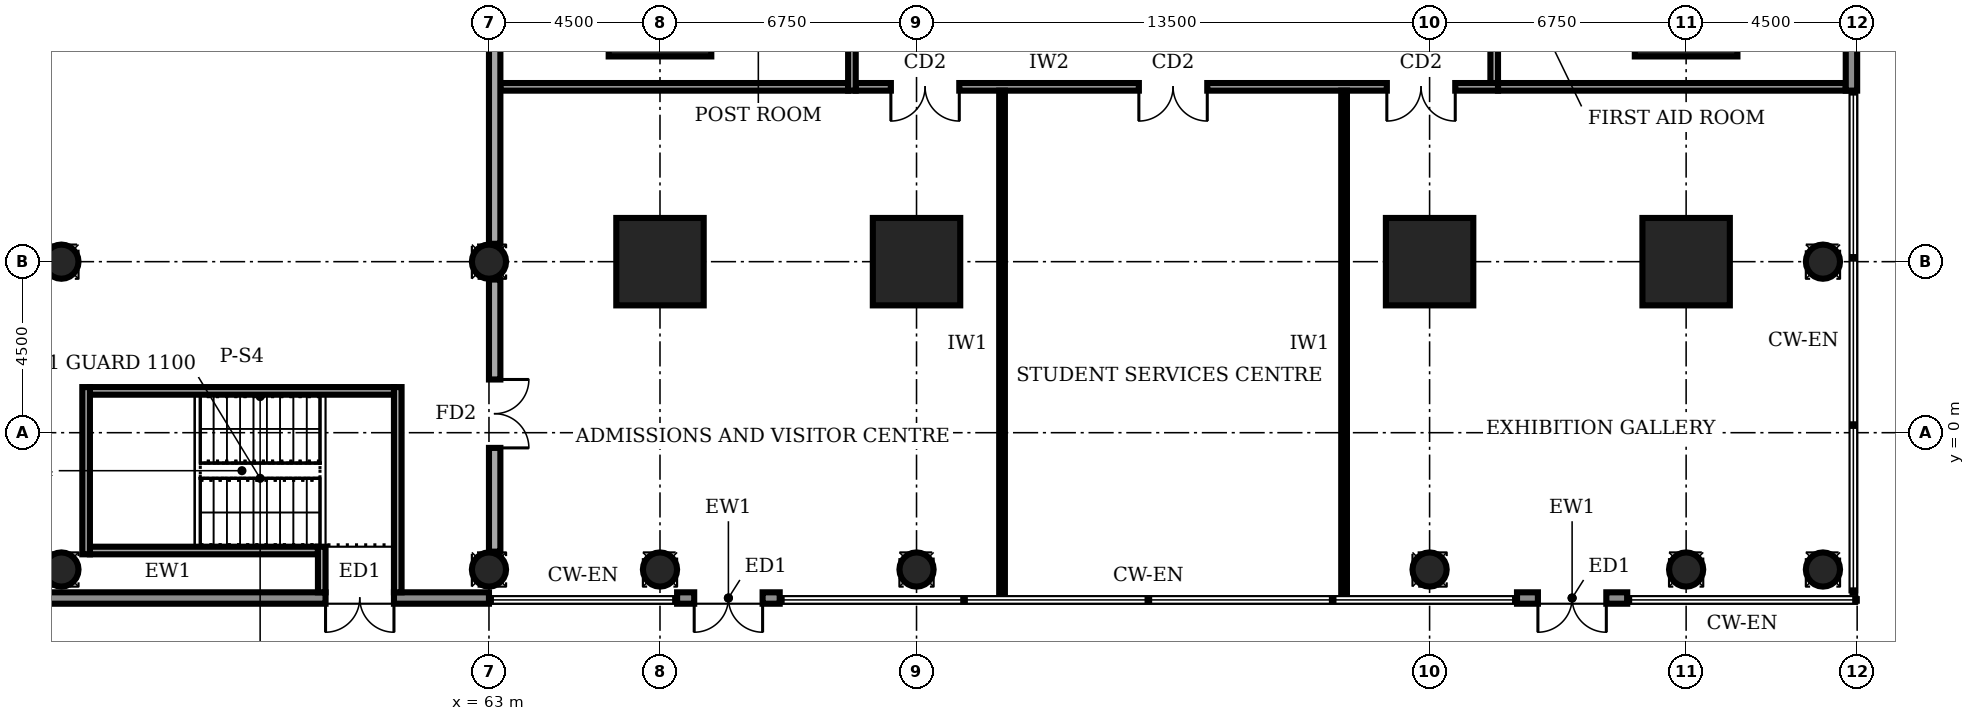
"""IFC4 building model, lengths in metres.
Left out: names, types, materials, properties, quantities, classifications, styles, units other than length and angle.
Written with IfcOpenShell. Run it as: python <this file> out.ifc"""

import sys

from ifc_helpers import new_model, si_unit, direction, frame, frame_2d, origin, origin_2d, place, context, subcontext, project, spatial, rectangle, circle, extrude, element, fill, save


model = new_model("IFC4")
c1 = context("Model", 3, precision=1e-05, world=origin(), true_north=direction((0.0, 1.0)))
c2 = subcontext(c1, "Body", "Model", "MODEL_VIEW")
j1 = project(units=[si_unit("LENGTHUNIT", "METRE"), si_unit("PLANEANGLEUNIT", "RADIAN")], contexts=[c1])
p1 = place(None, origin())
s1 = spatial("IfcSite", under=j1, at=p1, CompositionType="ELEMENT")
p2 = place(p1, origin())
s2 = spatial("IfcBuilding", under=s1, at=p2, CompositionType="ELEMENT")
p3 = place(p2, origin())
s3 = spatial("IfcBuildingStorey", under=s2, at=p3, CompositionType="ELEMENT", Elevation=0.0)
for number, where, z_axis, x_axis in (
    (1, (67.5, 4.5, -0.4), (0.0, 0.0, 1.0), (1.0, 0.0, 0.0)),
    (2, (74.25, 4.5, -0.4), (0.0, 0.0, 1.0), (1.0, 0.0, 0.0)),
    (3, (87.75, 4.5, -0.4), (0.0, 0.0, 1.0), (1.0, 0.0, 0.0)),
    (4, (94.5, 4.5, -0.4), (0.0, 0.0, 1.0), (1.0, 0.0, 0.0)),
):
    element("IfcColumn", number, at=place(p3, frame(where, z_axis=z_axis, x_axis=x_axis)), inside=s3, PredefinedType="COLUMN", context=c2, shape_type="SweptSolid", body=[
        extrude(rectangle(XDim=2.3, YDim=2.3, at=origin_2d()), origin(), (0.0, 0.0, 1.0), 6.4),
    ])
for number, where, z_axis, x_axis in (
    (5, (67.5, 11.25, -0.4), (0.0, 0.0, 1.0), (1.0, 0.0, 0.0)),
    (6, (94.5, 11.25, -0.4), (0.0, 0.0, 1.0), (1.0, 0.0, 0.0)),
):
    element("IfcColumn", number, at=place(p3, frame(where, z_axis=z_axis, x_axis=x_axis)), inside=s3, PredefinedType="COLUMN", context=c2, shape_type="SweptSolid", body=[
        extrude(rectangle(XDim=2.7, YDim=2.7, at=origin_2d()), origin(), (0.0, 0.0, 1.0), 6.4),
    ])
for number, where, z_axis, x_axis in (
    (7, (51.75, -3.6, -0.4), (0.0, 0.0, 1.0), (1.0, 0.0, 0.0)),
    (8, (63.0, -3.6, -0.4), (0.0, 0.0, 1.0), (1.0, 0.0, 0.0)),
    (9, (67.5, -3.6, -0.4), (0.0, 0.0, 1.0), (1.0, 0.0, 0.0)),
    (10, (74.25, -3.6, -0.4), (0.0, 0.0, 1.0), (1.0, 0.0, 0.0)),
    (11, (87.75, -3.6, -0.4), (0.0, 0.0, 1.0), (1.0, 0.0, 0.0)),
    (12, (94.5, -3.6, -0.4), (0.0, 0.0, 1.0), (1.0, 0.0, 0.0)),
    (13, (98.1, -3.6, -0.4), (0.0, 0.0, 1.0), (1.0, 0.0, 0.0)),
    (14, (51.75, 4.5, -0.4), (0.0, 0.0, 1.0), (1.0, 0.0, 0.0)),
    (15, (63.0, 4.5, -0.4), (0.0, 0.0, 1.0), (1.0, 0.0, 0.0)),
    (16, (98.1, 4.5, -0.4), (0.0, 0.0, 1.0), (1.0, 0.0, 0.0)),
):
    element("IfcColumn", number, at=place(p3, frame(where, z_axis=z_axis, x_axis=x_axis)), inside=s3, PredefinedType="COLUMN", context=c2, shape_type="SweptSolid", body=[
        extrude(circle(Radius=0.45, at=origin_2d()), origin(), (0.0, 0.0, 1.0), 6.4),
    ])
p4 = place(p3, frame((40.5, -4.35, 0.0), z_axis=(0.0, 0.0, 1.0), x_axis=(1.0, 0.0, 0.0)))
e17 = element("IfcWall", 17, at=p4, inside=s3, PredefinedType="STANDARD", context=c2, shape_type="SweptSolid", body=[
    extrude(rectangle(XDim=22.5, YDim=0.3, at=frame_2d((11.25, 0.0))), origin(), (0.0, 0.0, 1.0), 5.7),
])
p5 = place(p4, frame((3.6, 0.0, 0.0)))
e18 = element("IfcOpeningElement", 18, at=p5, cuts=e17, PredefinedType="OPENING", context=c2, shape_type="SweptSolid", body=[
    extrude(rectangle(XDim=1.8, YDim=2.4, at=frame_2d((0.9, 1.2))), frame((0.0, 0.16, 0.0), z_axis=(0.0, -1.0, 0.0), x_axis=(1.0, 0.0, 0.0)), (0.0, 0.0, 1.0), 0.32),
])
p6 = place(p4, frame((8.1, 0.0, 0.0)))
e19 = element("IfcOpeningElement", 19, at=p6, cuts=e17, PredefinedType="OPENING", context=c2, shape_type="SweptSolid", body=[
    extrude(rectangle(XDim=1.8, YDim=2.4, at=frame_2d((0.9, 1.2))), frame((0.0, 0.16, 0.0), z_axis=(0.0, -1.0, 0.0), x_axis=(1.0, 0.0, 0.0)), (0.0, 0.0, 1.0), 0.32),
])
p7 = place(p4, frame((18.2, 0.0, 0.0)))
e20 = element("IfcOpeningElement", 20, at=p7, cuts=e17, PredefinedType="OPENING", context=c2, shape_type="SweptSolid", body=[
    extrude(rectangle(XDim=1.8, YDim=2.4, at=frame_2d((0.9, 1.2))), frame((0.0, 0.16, 0.0), z_axis=(0.0, -1.0, 0.0), x_axis=(1.0, 0.0, 0.0)), (0.0, 0.0, 1.0), 0.32),
])
p8 = place(p3, frame((67.95, -4.35, 0.0), z_axis=(0.0, 0.0, 1.0), x_axis=(1.0, 0.0, 0.0)))
e21 = element("IfcWall", 21, at=p8, inside=s3, PredefinedType="STANDARD", context=c2, shape_type="SweptSolid", body=[
    extrude(rectangle(XDim=2.7, YDim=0.3, at=frame_2d((1.35, 0.0))), origin(), (0.0, 0.0, 1.0), 5.7),
])
p9 = place(p8, frame((0.45, 0.0, 0.0)))
e22 = element("IfcOpeningElement", 22, at=p9, cuts=e21, PredefinedType="OPENING", context=c2, shape_type="SweptSolid", body=[
    extrude(rectangle(XDim=1.8, YDim=2.4, at=frame_2d((0.9, 1.2))), frame((0.0, 0.16, 0.0), z_axis=(0.0, -1.0, 0.0), x_axis=(1.0, 0.0, 0.0)), (0.0, 0.0, 1.0), 0.32),
])
p10 = place(p3, frame((90.05, -4.35, 0.0), z_axis=(0.0, 0.0, 1.0), x_axis=(1.0, 0.0, 0.0)))
e23 = element("IfcWall", 23, at=p10, inside=s3, PredefinedType="STANDARD", context=c2, shape_type="SweptSolid", body=[
    extrude(rectangle(XDim=2.9, YDim=0.3, at=frame_2d((1.45, 0.0))), origin(), (0.0, 0.0, 1.0), 5.7),
])
p11 = place(p10, frame((0.55, 0.0, 0.0)))
e24 = element("IfcOpeningElement", 24, at=p11, cuts=e23, PredefinedType="OPENING", context=c2, shape_type="SweptSolid", body=[
    extrude(rectangle(XDim=1.8, YDim=2.4, at=frame_2d((0.9, 1.2))), frame((0.0, 0.16, 0.0), z_axis=(0.0, -1.0, 0.0), x_axis=(1.0, 0.0, 0.0)), (0.0, 0.0, 1.0), 0.32),
])
p12 = place(p3, frame((98.85, 9.0, 0.0), z_axis=(0.0, 0.0, 1.0), x_axis=(0.0, 1.0, 0.0)))
e25 = element("IfcWall", 25, at=p12, inside=s3, PredefinedType="STANDARD", context=c2, shape_type="SweptSolid", body=[
    extrude(rectangle(XDim=4.5, YDim=0.3, at=frame_2d((2.25, 0.0))), origin(), (0.0, 0.0, 1.0), 5.7),
])
p13 = place(p12, frame((2.8, 0.0, 0.0)))
e26 = element("IfcOpeningElement", 26, at=p13, cuts=e25, PredefinedType="OPENING", context=c2, shape_type="SweptSolid", body=[
    extrude(rectangle(XDim=1.6, YDim=2.4, at=frame_2d((0.8, 1.2))), frame((0.0, 0.16, 0.0), z_axis=(0.0, -1.0, 0.0), x_axis=(1.0, 0.0, 0.0)), (0.0, 0.0, 1.0), 0.32),
])
p14 = place(p3, frame((72.65, 9.1, 0.0), z_axis=(0.0, 0.0, 1.0), x_axis=(1.0, 0.0, 0.0)))
e27 = element("IfcWall", 27, at=p14, inside=s3, PredefinedType="SOLIDWALL", context=c2, shape_type="SweptSolid", body=[
    extrude(rectangle(XDim=16.9, YDim=0.2, at=frame_2d((8.45, 0.0))), origin(), (0.0, 0.0, 1.0), 5.7),
])
p15 = place(p14, frame((0.925, 0.0, 0.0)))
e28 = element("IfcOpeningElement", 28, at=p15, cuts=e27, PredefinedType="OPENING", context=c2, shape_type="SweptSolid", body=[
    extrude(rectangle(XDim=1.8, YDim=2.1, at=frame_2d((0.9, 1.05))), frame((0.0, 0.11, 0.0), z_axis=(0.0, -1.0, 0.0), x_axis=(1.0, 0.0, 0.0)), (0.0, 0.0, 1.0), 0.22),
])
p16 = place(p14, frame((7.45, 0.0, 0.0)))
e29 = element("IfcOpeningElement", 29, at=p16, cuts=e27, PredefinedType="OPENING", context=c2, shape_type="SweptSolid", body=[
    extrude(rectangle(XDim=1.8, YDim=2.1, at=frame_2d((0.9, 1.05))), frame((0.0, 0.11, 0.0), z_axis=(0.0, -1.0, 0.0), x_axis=(1.0, 0.0, 0.0)), (0.0, 0.0, 1.0), 0.22),
])
p17 = place(p14, frame((13.975, 0.0, 0.0)))
e30 = element("IfcOpeningElement", 30, at=p17, cuts=e27, PredefinedType="OPENING", context=c2, shape_type="SweptSolid", body=[
    extrude(rectangle(XDim=1.8, YDim=2.1, at=frame_2d((0.9, 1.05))), frame((0.0, 0.11, 0.0), z_axis=(0.0, -1.0, 0.0), x_axis=(1.0, 0.0, 0.0)), (0.0, 0.0, 1.0), 0.22),
])
p18 = place(p3, frame((89.45, 9.2, 0.0), z_axis=(0.0, 0.0, 1.0), x_axis=(0.0, 1.0, 0.0)))
e31 = element("IfcWall", 31, at=p18, inside=s3, PredefinedType="SOLIDWALL", context=c2, shape_type="SweptSolid", body=[
    extrude(rectangle(XDim=22.3, YDim=0.2, at=frame_2d((11.15, 0.0))), origin(), (0.0, 0.0, 1.0), 5.7),
])
p19 = place(p18, frame((1.55, 0.0, 0.0)))
e32 = element("IfcOpeningElement", 32, at=p19, cuts=e31, PredefinedType="OPENING", context=c2, shape_type="SweptSolid", body=[
    extrude(rectangle(XDim=1.0, YDim=2.1, at=frame_2d((0.5, 1.05))), frame((0.0, 0.11, 0.0), z_axis=(0.0, -1.0, 0.0), x_axis=(1.0, 0.0, 0.0)), (0.0, 0.0, 1.0), 0.22),
])
p20 = place(p18, frame((5.75, 0.0, 0.0)))
e33 = element("IfcOpeningElement", 33, at=p20, cuts=e31, PredefinedType="OPENING", context=c2, shape_type="SweptSolid", body=[
    extrude(rectangle(XDim=0.9, YDim=2.1, at=frame_2d((0.45, 1.05))), frame((0.0, 0.11, 0.0), z_axis=(0.0, -1.0, 0.0), x_axis=(1.0, 0.0, 0.0)), (0.0, 0.0, 1.0), 0.22),
])
p21 = place(p18, frame((8.75, 0.0, 0.0)))
e34 = element("IfcOpeningElement", 34, at=p21, cuts=e31, PredefinedType="OPENING", context=c2, shape_type="SweptSolid", body=[
    extrude(rectangle(XDim=0.9, YDim=2.1, at=frame_2d((0.45, 1.05))), frame((0.0, 0.11, 0.0), z_axis=(0.0, -1.0, 0.0), x_axis=(1.0, 0.0, 0.0)), (0.0, 0.0, 1.0), 0.22),
])
p22 = place(p18, frame((13.6, 0.0, 0.0)))
e35 = element("IfcOpeningElement", 35, at=p22, cuts=e31, PredefinedType="OPENING", context=c2, shape_type="SweptSolid", body=[
    extrude(rectangle(XDim=0.9, YDim=2.1, at=frame_2d((0.45, 1.05))), frame((0.0, 0.11, 0.0), z_axis=(0.0, -1.0, 0.0), x_axis=(1.0, 0.0, 0.0)), (0.0, 0.0, 1.0), 0.22),
])
p23 = place(p18, frame((16.3, 0.0, 0.0)))
e36 = element("IfcOpeningElement", 36, at=p23, cuts=e31, PredefinedType="OPENING", context=c2, shape_type="SweptSolid", body=[
    extrude(rectangle(XDim=1.0, YDim=2.1, at=frame_2d((0.5, 1.05))), frame((0.0, 0.11, 0.0), z_axis=(0.0, -1.0, 0.0), x_axis=(1.0, 0.0, 0.0)), (0.0, 0.0, 1.0), 0.22),
])
p24 = place(p18, frame((10.8, 0.0, 0.0)))
e37 = element("IfcOpeningElement", 37, at=p24, cuts=e31, PredefinedType="OPENING", context=c2, shape_type="SweptSolid", body=[
    extrude(rectangle(XDim=1.0, YDim=2.1, at=frame_2d((0.5, 1.05))), frame((0.0, 0.11, 0.0), z_axis=(0.0, -1.0, 0.0), x_axis=(1.0, 0.0, 0.0)), (0.0, 0.0, 1.0), 0.22),
])
p25 = place(p18, frame((19.25, 0.0, 0.0)))
e38 = element("IfcOpeningElement", 38, at=p25, cuts=e31, PredefinedType="OPENING", context=c2, shape_type="SweptSolid", body=[
    extrude(rectangle(XDim=1.6, YDim=2.1, at=frame_2d((0.8, 1.05))), frame((0.0, 0.11, 0.0), z_axis=(0.0, -1.0, 0.0), x_axis=(1.0, 0.0, 0.0)), (0.0, 0.0, 1.0), 0.22),
])
p26 = place(p3, frame((72.55, 31.3, 0.0), z_axis=(0.0, 0.0, 1.0), x_axis=(0.0, -1.0, 0.0)))
e39 = element("IfcWall", 39, at=p26, inside=s3, PredefinedType="SOLIDWALL", context=c2, shape_type="SweptSolid", body=[
    extrude(rectangle(XDim=22.3, YDim=0.2, at=frame_2d((11.15, 0.0))), origin(), (0.0, 0.0, 1.0), 5.7),
])
p27 = place(p26, frame((19.55, 0.0, 0.0)))
e40 = element("IfcOpeningElement", 40, at=p27, cuts=e39, PredefinedType="OPENING", context=c2, shape_type="SweptSolid", body=[
    extrude(rectangle(XDim=1.0, YDim=2.1, at=frame_2d((0.5, 1.05))), frame((0.0, 0.11, 0.0), z_axis=(0.0, -1.0, 0.0), x_axis=(1.0, 0.0, 0.0)), (0.0, 0.0, 1.0), 0.22),
])
p28 = place(p26, frame((10.15, 0.0, 0.0)))
e41 = element("IfcOpeningElement", 41, at=p28, cuts=e39, PredefinedType="OPENING", context=c2, shape_type="SweptSolid", body=[
    extrude(rectangle(XDim=1.8, YDim=2.1, at=frame_2d((0.9, 1.05))), frame((0.0, 0.11, 0.0), z_axis=(0.0, -1.0, 0.0), x_axis=(1.0, 0.0, 0.0)), (0.0, 0.0, 1.0), 0.22),
])
p29 = place(p26, frame((1.55, 0.0, 0.0)))
e42 = element("IfcOpeningElement", 42, at=p29, cuts=e39, PredefinedType="OPENING", context=c2, shape_type="SweptSolid", body=[
    extrude(rectangle(XDim=1.0, YDim=2.1, at=frame_2d((0.5, 1.05))), frame((0.0, 0.11, 0.0), z_axis=(0.0, -1.0, 0.0), x_axis=(1.0, 0.0, 0.0)), (0.0, 0.0, 1.0), 0.22),
])
for number, where, z_axis, x_axis in (
    (43, (63.3, 9.1, 0.0), (0.0, 0.0, 1.0), (1.0, 0.0, 0.0)),
    (44, (89.55, 9.1, 0.0), (0.0, 0.0, 1.0), (1.0, 0.0, 0.0)),
):
    element("IfcWall", number, at=place(p3, frame(where, z_axis=z_axis, x_axis=x_axis)), inside=s3, PredefinedType="SOLIDWALL", context=c2, shape_type="SweptSolid", body=[
        extrude(rectangle(XDim=9.15, YDim=0.2, at=frame_2d((4.575, 0.0))), origin(), (0.0, 0.0, 1.0), 5.7),
    ])
for number, where, z_axis, x_axis in (
    (45, (76.5, -4.32, 0.0), (0.0, 0.0, 1.0), (0.0, 1.0, 0.0)),
    (46, (85.5, -4.32, 0.0), (0.0, 0.0, 1.0), (0.0, 1.0, 0.0)),
):
    element("IfcWall", number, at=place(p3, frame(where, z_axis=z_axis, x_axis=x_axis)), inside=s3, PredefinedType="PARTITIONING", context=c2, shape_type="SweptSolid", body=[
        extrude(rectangle(XDim=13.32, YDim=0.15, at=frame_2d((6.66, 0.0))), origin(), (0.0, 0.0, 1.0), 5.7),
    ])
p30 = place(p3, frame((52.5, 1.1, 0.0), z_axis=(0.0, 0.0, 1.0), x_axis=(1.0, 0.0, 0.0)))
e47 = element("IfcWall", 47, at=p30, inside=s3, PredefinedType="SOLIDWALL", context=c2, shape_type="SweptSolid", body=[
    extrude(rectangle(XDim=8.0, YDim=0.2, at=frame_2d((4.0, 0.0))), origin(), (0.0, 0.0, 1.0), 5.7),
])
p31 = place(p3, frame((52.5, -3.1, 0.0), z_axis=(0.0, 0.0, 1.0), x_axis=(1.0, 0.0, 0.0)))
e48 = element("IfcWall", 48, at=p31, inside=s3, PredefinedType="SOLIDWALL", context=c2, shape_type="SweptSolid", body=[
    extrude(rectangle(XDim=6.0, YDim=0.2, at=frame_2d((3.0, 0.0))), origin(), (0.0, 0.0, 1.0), 5.7),
])
p32 = place(p3, frame((58.6, -3.0, 0.0), z_axis=(0.0, 0.0, 1.0), x_axis=(0.0, -1.0, 0.0)))
e49 = element("IfcWall", 49, at=p32, inside=s3, PredefinedType="SOLIDWALL", context=c2, shape_type="SweptSolid", body=[
    extrude(rectangle(XDim=1.2, YDim=0.2, at=frame_2d((0.6, 0.0))), origin(), (0.0, 0.0, 1.0), 5.7),
])
p33 = place(p3, frame((52.4, -3.2, 0.0), z_axis=(0.0, 0.0, 1.0), x_axis=(0.0, 1.0, 0.0)))
e50 = element("IfcWall", 50, at=p33, inside=s3, PredefinedType="SOLIDWALL", context=c2, shape_type="SweptSolid", body=[
    extrude(rectangle(XDim=4.4, YDim=0.2, at=frame_2d((2.2, 0.0))), origin(), (0.0, 0.0, 1.0), 5.7),
])
p34 = place(p3, frame((60.6, -4.2, 0.0), z_axis=(0.0, 0.0, 1.0), x_axis=(0.0, 1.0, 0.0)))
e51 = element("IfcWall", 51, at=p34, inside=s3, PredefinedType="SOLIDWALL", context=c2, shape_type="SweptSolid", body=[
    extrude(rectangle(XDim=5.4, YDim=0.2, at=frame_2d((2.7, 0.0))), origin(), (0.0, 0.0, 1.0), 5.7),
])
p35 = place(p3, frame((63.15, -3.13, 0.0), z_axis=(0.0, 0.0, 1.0), x_axis=(0.0, 1.0, 0.0)))
e52 = element("IfcWall", 52, at=p35, inside=s3, PredefinedType="SOLIDWALL", context=c2, shape_type="SweptSolid", body=[
    extrude(rectangle(XDim=7.16, YDim=0.3, at=frame_2d((3.58, 0.0))), origin(), (0.0, 0.0, 1.0), 4.7),
])
p36 = place(p35, frame((2.73, 0.0, 0.0)))
e53 = element("IfcOpeningElement", 53, at=p36, cuts=e52, PredefinedType="OPENING", context=c2, shape_type="SweptSolid", body=[
    extrude(rectangle(XDim=1.8, YDim=2.1, at=frame_2d((0.9, 1.05))), frame((0.0, 0.16, 0.0), z_axis=(0.0, -1.0, 0.0), x_axis=(1.0, 0.0, 0.0)), (0.0, 0.0, 1.0), 0.32),
])
p37 = place(p3, frame((63.15, 4.97, 0.0), z_axis=(0.0, 0.0, 1.0), x_axis=(0.0, 1.0, 0.0)))
e54 = element("IfcWall", 54, at=p37, inside=s3, PredefinedType="SOLIDWALL", context=c2, shape_type="SweptSolid", body=[
    extrude(rectangle(XDim=43.16, YDim=0.3, at=frame_2d((21.58, 0.0))), origin(), (0.0, 0.0, 1.0), 5.7),
])
p38 = place(p37, frame((9.88, 0.0, 0.0)))
e55 = element("IfcOpeningElement", 55, at=p38, cuts=e54, PredefinedType="OPENING", context=c2, shape_type="SweptSolid", body=[
    extrude(rectangle(XDim=1.8, YDim=2.1, at=frame_2d((0.9, 1.05))), frame((0.0, 0.16, 0.0), z_axis=(0.0, -1.0, 0.0), x_axis=(1.0, 0.0, 0.0)), (0.0, 0.0, 1.0), 0.32),
])
p39 = place(p37, frame((38.63, 0.0, 0.0)))
e56 = element("IfcOpeningElement", 56, at=p39, cuts=e54, PredefinedType="OPENING", context=c2, shape_type="SweptSolid", body=[
    extrude(rectangle(XDim=1.8, YDim=2.1, at=frame_2d((0.9, 1.05))), frame((0.0, 0.16, 0.0), z_axis=(0.0, -1.0, 0.0), x_axis=(1.0, 0.0, 0.0)), (0.0, 0.0, 1.0), 0.32),
])
p40 = place(p7, frame((1.8, 0.0, 0.0), z_axis=(0.0, 0.0, 1.0), x_axis=(-1.0, 0.0, 0.0)))
e57 = element("IfcDoor", 57, at=p40, inside=s3, OperationType="DOUBLE_DOOR_SINGLE_SWING", PredefinedType="DOOR", context=c2, shape_type="SweptSolid", body=[
    extrude(rectangle(XDim=1.8, YDim=2.4, at=frame_2d((0.9, 1.2))), frame((0.0, 0.025, 0.0), z_axis=(0.0, -1.0, 0.0), x_axis=(1.0, 0.0, 0.0)), (0.0, 0.0, 1.0), 0.05),
])
fill(e20, e57)
p41 = place(p9, frame((1.8, 0.0, 0.0), z_axis=(0.0, 0.0, 1.0), x_axis=(-1.0, 0.0, 0.0)))
e58 = element("IfcDoor", 58, at=p41, inside=s3, OperationType="DOUBLE_DOOR_SINGLE_SWING", PredefinedType="DOOR", context=c2, shape_type="SweptSolid", body=[
    extrude(rectangle(XDim=1.8, YDim=2.4, at=frame_2d((0.9, 1.2))), frame((0.0, 0.025, 0.0), z_axis=(0.0, -1.0, 0.0), x_axis=(1.0, 0.0, 0.0)), (0.0, 0.0, 1.0), 0.05),
])
fill(e22, e58)
p42 = place(p11, frame((1.8, 0.0, 0.0), z_axis=(0.0, 0.0, 1.0), x_axis=(-1.0, 0.0, 0.0)))
e59 = element("IfcDoor", 59, at=p42, inside=s3, OperationType="DOUBLE_DOOR_SINGLE_SWING", PredefinedType="DOOR", context=c2, shape_type="SweptSolid", body=[
    extrude(rectangle(XDim=1.8, YDim=2.4, at=frame_2d((0.9, 1.2))), frame((0.0, 0.025, 0.0), z_axis=(0.0, -1.0, 0.0), x_axis=(1.0, 0.0, 0.0)), (0.0, 0.0, 1.0), 0.05),
])
fill(e24, e59)
p43 = place(p15, frame((1.8, 0.0, 0.0), z_axis=(0.0, 0.0, 1.0), x_axis=(-1.0, 0.0, 0.0)))
e60 = element("IfcDoor", 60, at=p43, inside=s3, OperationType="DOUBLE_DOOR_SINGLE_SWING", PredefinedType="DOOR", context=c2, shape_type="SweptSolid", body=[
    extrude(rectangle(XDim=1.8, YDim=2.1, at=frame_2d((0.9, 1.05))), frame((0.0, 0.025, 0.0), z_axis=(0.0, -1.0, 0.0), x_axis=(1.0, 0.0, 0.0)), (0.0, 0.0, 1.0), 0.05),
])
fill(e28, e60)
p44 = place(p16, frame((1.8, 0.0, 0.0), z_axis=(0.0, 0.0, 1.0), x_axis=(-1.0, 0.0, 0.0)))
e61 = element("IfcDoor", 61, at=p44, inside=s3, OperationType="DOUBLE_DOOR_SINGLE_SWING", PredefinedType="DOOR", context=c2, shape_type="SweptSolid", body=[
    extrude(rectangle(XDim=1.8, YDim=2.1, at=frame_2d((0.9, 1.05))), frame((0.0, 0.025, 0.0), z_axis=(0.0, -1.0, 0.0), x_axis=(1.0, 0.0, 0.0)), (0.0, 0.0, 1.0), 0.05),
])
fill(e29, e61)
p45 = place(p17, frame((1.8, 0.0, 0.0), z_axis=(0.0, 0.0, 1.0), x_axis=(-1.0, 0.0, 0.0)))
e62 = element("IfcDoor", 62, at=p45, inside=s3, OperationType="DOUBLE_DOOR_SINGLE_SWING", PredefinedType="DOOR", context=c2, shape_type="SweptSolid", body=[
    extrude(rectangle(XDim=1.8, YDim=2.1, at=frame_2d((0.9, 1.05))), frame((0.0, 0.025, 0.0), z_axis=(0.0, -1.0, 0.0), x_axis=(1.0, 0.0, 0.0)), (0.0, 0.0, 1.0), 0.05),
])
fill(e30, e62)
p46 = place(p36, frame((1.8, 0.0, 0.0), z_axis=(0.0, 0.0, 1.0), x_axis=(-1.0, 0.0, 0.0)))
e63 = element("IfcDoor", 63, at=p46, inside=s3, OperationType="DOUBLE_DOOR_SINGLE_SWING", PredefinedType="DOOR", context=c2, shape_type="SweptSolid", body=[
    extrude(rectangle(XDim=1.8, YDim=2.1, at=frame_2d((0.9, 1.05))), frame((0.0, 0.025, 0.0), z_axis=(0.0, -1.0, 0.0), x_axis=(1.0, 0.0, 0.0)), (0.0, 0.0, 1.0), 0.05),
])
fill(e53, e63)
save(model, sys.argv[1])
